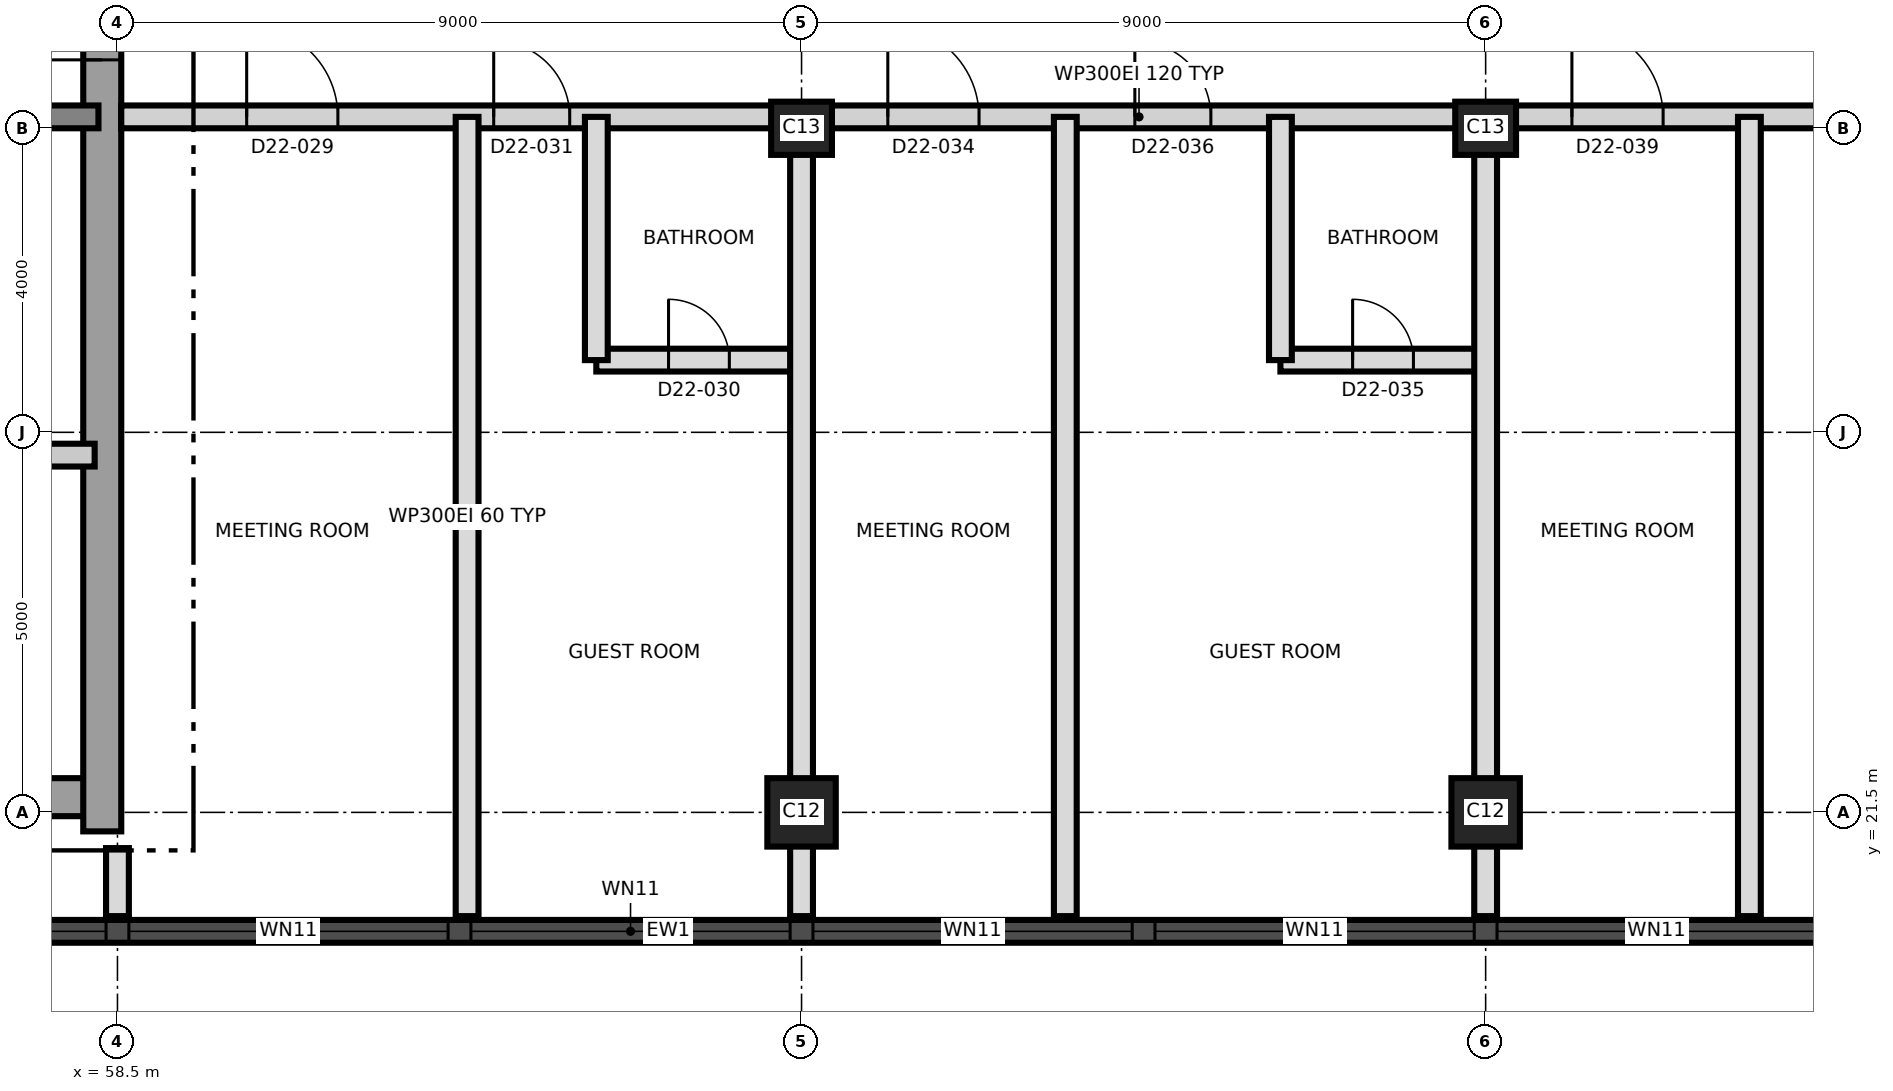
"""IFC4 building model, lengths in metres.
Left out: names, types, materials, properties, quantities, classifications, styles, units other than length and angle.
Written with IfcOpenShell. Run it as: python <this file> out.ifc"""

import sys

from ifc_helpers import new_model, si_unit, direction, frame, frame_2d, origin, origin_2d, place, context, subcontext, project, spatial, rectangle, extrude, element, fill, save


model = new_model("IFC4")
c1 = context("Model", 3, precision=1e-05, world=origin(), true_north=direction((0.0, 1.0)))
c2 = subcontext(c1, "Body", "Model", "MODEL_VIEW")
j1 = project(units=[si_unit("LENGTHUNIT", "METRE"), si_unit("PLANEANGLEUNIT", "RADIAN")], contexts=[c1])
p1 = place(None, origin())
s1 = spatial("IfcSite", under=j1, at=p1, CompositionType="ELEMENT")
p2 = place(p1, origin())
s2 = spatial("IfcBuilding", under=s1, at=p2, CompositionType="ELEMENT")
p3 = place(p2, frame((0.0, 0.0, 199.5)))
s3 = spatial("IfcBuildingStorey", under=s2, at=p3, CompositionType="ELEMENT", Elevation=199.5)
p4 = place(p3, frame((31.25, 21.7, 0.0), z_axis=(0.0, 0.0, 1.0), x_axis=(1.0, 0.0, 0.0)))
e1 = element("IfcWall", 1, at=p4, inside=s3, PredefinedType="SHEAR", context=c2, shape_type="SweptSolid", body=[
    extrude(rectangle(XDim=27.0, YDim=0.5, at=frame_2d((13.5, 0.0))), origin(), (0.0, 0.0, 1.0), 3.7),
])
p5 = place(p3, frame((58.3, 21.25, 0.0), z_axis=(0.0, 0.0, 1.0), x_axis=(0.0, 1.0, 0.0)))
e2 = element("IfcWall", 2, at=p5, inside=s3, PredefinedType="SHEAR", context=c2, shape_type="SweptSolid", body=[
    extrude(rectangle(XDim=18.5, YDim=0.5, at=frame_2d((9.25, 0.0))), origin(), (0.0, 0.0, 1.0), 3.7),
])
p6 = place(p5, frame((10.15, 0.0, 0.0)))
e3 = element("IfcOpeningElement", 3, at=p6, cuts=e2, PredefinedType="OPENING", context=c2, shape_type="SweptSolid", body=[
    extrude(rectangle(XDim=1.2, YDim=2.1, at=frame_2d((0.6, 1.05))), frame((0.0, 0.26, 0.0), z_axis=(0.0, -1.0, 0.0), x_axis=(1.0, 0.0, 0.0)), (0.0, 0.0, 1.0), 0.52),
])
p7 = place(p3, frame((31.75, 30.65, 0.0), z_axis=(0.0, 0.0, 1.0), x_axis=(1.0, 0.0, 0.0)))
e4 = element("IfcWall", 4, at=p7, inside=s3, PredefinedType="SHEAR", context=c2, shape_type="SweptSolid", body=[
    extrude(rectangle(XDim=26.5, YDim=0.3, at=frame_2d((13.25, 0.0))), origin(), (0.0, 0.0, 1.0), 3.7),
])
p8 = place(p7, frame((24.75, 0.0, 0.0)))
e5 = element("IfcOpeningElement", 5, at=p8, cuts=e4, PredefinedType="OPENING", context=c2, shape_type="SweptSolid", body=[
    extrude(rectangle(XDim=1.0, YDim=2.1, at=frame_2d((0.5, 1.05))), frame((0.0, 0.16, 0.0), z_axis=(0.0, -1.0, 0.0), x_axis=(1.0, 0.0, 0.0)), (0.0, 0.0, 1.0), 0.32),
])
p9 = place(p7, frame((4.05, 0.0, 0.0)))
e6 = element("IfcOpeningElement", 6, at=p9, cuts=e4, PredefinedType="OPENING", context=c2, shape_type="SweptSolid", body=[
    extrude(rectangle(XDim=1.0, YDim=2.1, at=frame_2d((0.5, 1.05))), frame((0.0, 0.16, 0.0), z_axis=(0.0, -1.0, 0.0), x_axis=(1.0, 0.0, 0.0)), (0.0, 0.0, 1.0), 0.32),
])
for number, where, z_axis, x_axis in (
    (7, (67.5, 21.5, 0.0), (0.0, 0.0, 1.0), (1.0, 0.0, 0.0)),
    (8, (76.5, 21.5, 0.0), (0.0, 0.0, 1.0), (1.0, 0.0, 0.0)),
):
    element("IfcColumn", number, at=place(p3, frame(where, z_axis=z_axis, x_axis=x_axis)), inside=s3, PredefinedType="COLUMN", context=c2, shape_type="SweptSolid", body=[
        extrude(rectangle(XDim=0.9, YDim=0.9, at=origin_2d()), origin(), (0.0, 0.0, 1.0), 3.7),
    ])
for number, where, z_axis, x_axis in (
    (9, (67.5, 30.5, 0.0), (0.0, 0.0, 1.0), (1.0, 0.0, 0.0)),
    (10, (76.5, 30.5, 0.0), (0.0, 0.0, 1.0), (1.0, 0.0, 0.0)),
):
    element("IfcColumn", number, at=place(p3, frame(where, z_axis=z_axis, x_axis=x_axis)), inside=s3, PredefinedType="COLUMN", context=c2, shape_type="SweptSolid", body=[
        extrude(rectangle(XDim=0.8, YDim=0.7, at=origin_2d()), origin(), (0.0, 0.0, 1.0), 3.7),
    ])
p10 = place(p3, frame((44.01, 19.935, 0.0), z_axis=(0.0, 0.0, 1.0), x_axis=(1.0, 0.0, 0.0)))
e11 = element("IfcWall", 11, at=p10, inside=s3, PredefinedType="SOLIDWALL", context=c2, shape_type="SweptSolid", body=[
    extrude(rectangle(XDim=43.477, YDim=0.3, at=frame_2d((21.738, 0.0))), origin(), (0.0, 0.0, 1.0), 3.4),
])
p11 = place(p10, frame((1.845, 0.0, 0.3)))
e12 = element("IfcOpeningElement", 12, at=p11, cuts=e11, PredefinedType="OPENING", context=c2, shape_type="SweptSolid", body=[
    extrude(rectangle(XDim=1.8, YDim=2.4, at=frame_2d((0.9, 1.2))), frame((0.0, 0.16, 0.0), z_axis=(0.0, -1.0, 0.0), x_axis=(1.0, 0.0, 0.0)), (0.0, 0.0, 1.0), 0.32),
])
p12 = place(p10, frame((5.64, 0.0, 0.9)))
e13 = element("IfcOpeningElement", 13, at=p12, cuts=e11, PredefinedType="OPENING", context=c2, shape_type="SweptSolid", body=[
    extrude(rectangle(XDim=4.2, YDim=1.5, at=frame_2d((2.1, 0.75))), frame((0.0, 0.16, 0.0), z_axis=(0.0, -1.0, 0.0), x_axis=(1.0, 0.0, 0.0)), (0.0, 0.0, 1.0), 0.32),
])
p13 = place(p10, frame((10.14, 0.0, 0.9)))
e14 = element("IfcOpeningElement", 14, at=p13, cuts=e11, PredefinedType="OPENING", context=c2, shape_type="SweptSolid", body=[
    extrude(rectangle(XDim=4.2, YDim=1.5, at=frame_2d((2.1, 0.75))), frame((0.0, 0.16, 0.0), z_axis=(0.0, -1.0, 0.0), x_axis=(1.0, 0.0, 0.0)), (0.0, 0.0, 1.0), 0.32),
])
p14 = place(p10, frame((14.64, 0.0, 0.9)))
e15 = element("IfcOpeningElement", 15, at=p14, cuts=e11, PredefinedType="OPENING", context=c2, shape_type="SweptSolid", body=[
    extrude(rectangle(XDim=4.2, YDim=1.5, at=frame_2d((2.1, 0.75))), frame((0.0, 0.16, 0.0), z_axis=(0.0, -1.0, 0.0), x_axis=(1.0, 0.0, 0.0)), (0.0, 0.0, 1.0), 0.32),
])
p15 = place(p10, frame((19.14, 0.0, 0.9)))
e16 = element("IfcOpeningElement", 16, at=p15, cuts=e11, PredefinedType="OPENING", context=c2, shape_type="SweptSolid", body=[
    extrude(rectangle(XDim=4.2, YDim=1.5, at=frame_2d((2.1, 0.75))), frame((0.0, 0.16, 0.0), z_axis=(0.0, -1.0, 0.0), x_axis=(1.0, 0.0, 0.0)), (0.0, 0.0, 1.0), 0.32),
])
p16 = place(p10, frame((23.64, 0.0, 0.9)))
e17 = element("IfcOpeningElement", 17, at=p16, cuts=e11, PredefinedType="OPENING", context=c2, shape_type="SweptSolid", body=[
    extrude(rectangle(XDim=4.2, YDim=1.5, at=frame_2d((2.1, 0.75))), frame((0.0, 0.16, 0.0), z_axis=(0.0, -1.0, 0.0), x_axis=(1.0, 0.0, 0.0)), (0.0, 0.0, 1.0), 0.32),
])
p17 = place(p10, frame((28.14, 0.0, 0.9)))
e18 = element("IfcOpeningElement", 18, at=p17, cuts=e11, PredefinedType="OPENING", context=c2, shape_type="SweptSolid", body=[
    extrude(rectangle(XDim=4.2, YDim=1.5, at=frame_2d((2.1, 0.75))), frame((0.0, 0.16, 0.0), z_axis=(0.0, -1.0, 0.0), x_axis=(1.0, 0.0, 0.0)), (0.0, 0.0, 1.0), 0.32),
])
p18 = place(p10, frame((32.64, 0.0, 0.9)))
e19 = element("IfcOpeningElement", 19, at=p18, cuts=e11, PredefinedType="OPENING", context=c2, shape_type="SweptSolid", body=[
    extrude(rectangle(XDim=4.2, YDim=1.5, at=frame_2d((2.1, 0.75))), frame((0.0, 0.16, 0.0), z_axis=(0.0, -1.0, 0.0), x_axis=(1.0, 0.0, 0.0)), (0.0, 0.0, 1.0), 0.32),
])
p19 = place(p10, frame((37.14, 0.0, 0.9)))
e20 = element("IfcOpeningElement", 20, at=p19, cuts=e11, PredefinedType="OPENING", context=c2, shape_type="SweptSolid", body=[
    extrude(rectangle(XDim=4.2, YDim=1.5, at=frame_2d((2.1, 0.75))), frame((0.0, 0.16, 0.0), z_axis=(0.0, -1.0, 0.0), x_axis=(1.0, 0.0, 0.0)), (0.0, 0.0, 1.0), 0.32),
])
p20 = place(p3, frame((55.8, 26.2, 0.0), z_axis=(0.0, 0.0, 1.0), x_axis=(1.0, 0.0, 0.0)))
e21 = element("IfcWall", 21, at=p20, inside=s3, PredefinedType="PARTITIONING", context=c2, shape_type="SweptSolid", body=[
    extrude(rectangle(XDim=2.4, YDim=0.3, at=frame_2d((1.2, 0.0))), origin(), (0.0, 0.0, 1.0), 3.4),
])
p21 = place(p20, frame((0.75, 0.0, 0.0)))
e22 = element("IfcOpeningElement", 22, at=p21, cuts=e21, PredefinedType="OPENING", context=c2, shape_type="SweptSolid", body=[
    extrude(rectangle(XDim=0.9, YDim=2.1, at=frame_2d((0.45, 1.05))), frame((0.0, 0.16, 0.0), z_axis=(0.0, -1.0, 0.0), x_axis=(1.0, 0.0, 0.0)), (0.0, 0.0, 1.0), 0.32),
])
p22 = place(p3, frame((64.8, 27.45, 0.0), z_axis=(0.0, 0.0, 1.0), x_axis=(1.0, 0.0, 0.0)))
e23 = element("IfcWall", 23, at=p22, inside=s3, PredefinedType="PARTITIONING", context=c2, shape_type="SweptSolid", body=[
    extrude(rectangle(XDim=2.7, YDim=0.3, at=frame_2d((1.35, 0.0))), origin(), (0.0, 0.0, 1.0), 3.4),
])
p23 = place(p22, frame((0.95, 0.0, 0.0)))
e24 = element("IfcOpeningElement", 24, at=p23, cuts=e23, PredefinedType="OPENING", context=c2, shape_type="SweptSolid", body=[
    extrude(rectangle(XDim=0.8, YDim=2.1, at=frame_2d((0.4, 1.05))), frame((0.0, 0.16, 0.0), z_axis=(0.0, -1.0, 0.0), x_axis=(1.0, 0.0, 0.0)), (0.0, 0.0, 1.0), 0.32),
])
p24 = place(p3, frame((73.8, 27.45, 0.0), z_axis=(0.0, 0.0, 1.0), x_axis=(1.0, 0.0, 0.0)))
e25 = element("IfcWall", 25, at=p24, inside=s3, PredefinedType="PARTITIONING", context=c2, shape_type="SweptSolid", body=[
    extrude(rectangle(XDim=2.7, YDim=0.3, at=frame_2d((1.35, 0.0))), origin(), (0.0, 0.0, 1.0), 3.4),
])
p25 = place(p24, frame((0.95, 0.0, 0.0)))
e26 = element("IfcOpeningElement", 26, at=p25, cuts=e25, PredefinedType="OPENING", context=c2, shape_type="SweptSolid", body=[
    extrude(rectangle(XDim=0.8, YDim=2.1, at=frame_2d((0.4, 1.05))), frame((0.0, 0.16, 0.0), z_axis=(0.0, -1.0, 0.0), x_axis=(1.0, 0.0, 0.0)), (0.0, 0.0, 1.0), 0.32),
])
p26 = place(p3, frame((58.55, 30.65, 0.0), z_axis=(0.0, 0.0, 1.0), x_axis=(1.0, 0.0, 0.0)))
e27 = element("IfcWall", 27, at=p26, inside=s3, PredefinedType="PARTITIONING", context=c2, shape_type="SweptSolid", body=[
    extrude(rectangle(XDim=26.78, YDim=0.3, at=frame_2d((13.39, 0.0))), origin(), (0.0, 0.0, 1.0), 3.4),
])
p27 = place(p26, frame((1.65, 0.0, 0.0)))
e28 = element("IfcOpeningElement", 28, at=p27, cuts=e27, PredefinedType="OPENING", context=c2, shape_type="SweptSolid", body=[
    extrude(rectangle(XDim=1.2, YDim=2.1, at=frame_2d((0.6, 1.05))), frame((0.0, 0.16, 0.0), z_axis=(0.0, -1.0, 0.0), x_axis=(1.0, 0.0, 0.0)), (0.0, 0.0, 1.0), 0.32),
])
p28 = place(p26, frame((4.9, 0.0, 0.0)))
e29 = element("IfcOpeningElement", 29, at=p28, cuts=e27, PredefinedType="OPENING", context=c2, shape_type="SweptSolid", body=[
    extrude(rectangle(XDim=1.0, YDim=2.1, at=frame_2d((0.5, 1.05))), frame((0.0, 0.16, 0.0), z_axis=(0.0, -1.0, 0.0), x_axis=(1.0, 0.0, 0.0)), (0.0, 0.0, 1.0), 0.32),
])
p29 = place(p26, frame((10.085, 0.0, 0.0)))
e30 = element("IfcOpeningElement", 30, at=p29, cuts=e27, PredefinedType="OPENING", context=c2, shape_type="SweptSolid", body=[
    extrude(rectangle(XDim=1.2, YDim=2.1, at=frame_2d((0.6, 1.05))), frame((0.0, 0.16, 0.0), z_axis=(0.0, -1.0, 0.0), x_axis=(1.0, 0.0, 0.0)), (0.0, 0.0, 1.0), 0.32),
])
p30 = place(p26, frame((13.335, 0.0, 0.0)))
e31 = element("IfcOpeningElement", 31, at=p30, cuts=e27, PredefinedType="OPENING", context=c2, shape_type="SweptSolid", body=[
    extrude(rectangle(XDim=1.0, YDim=2.1, at=frame_2d((0.5, 1.05))), frame((0.0, 0.16, 0.0), z_axis=(0.0, -1.0, 0.0), x_axis=(1.0, 0.0, 0.0)), (0.0, 0.0, 1.0), 0.32),
])
p31 = place(p26, frame((19.085, 0.0, 0.0)))
e32 = element("IfcOpeningElement", 32, at=p31, cuts=e27, PredefinedType="OPENING", context=c2, shape_type="SweptSolid", body=[
    extrude(rectangle(XDim=1.2, YDim=2.1, at=frame_2d((0.6, 1.05))), frame((0.0, 0.16, 0.0), z_axis=(0.0, -1.0, 0.0), x_axis=(1.0, 0.0, 0.0)), (0.0, 0.0, 1.0), 0.32),
])
p32 = place(p26, frame((22.335, 0.0, 0.0)))
e33 = element("IfcOpeningElement", 33, at=p32, cuts=e27, PredefinedType="OPENING", context=c2, shape_type="SweptSolid", body=[
    extrude(rectangle(XDim=1.0, YDim=2.1, at=frame_2d((0.5, 1.05))), frame((0.0, 0.16, 0.0), z_axis=(0.0, -1.0, 0.0), x_axis=(1.0, 0.0, 0.0)), (0.0, 0.0, 1.0), 0.32),
])
p33 = place(p3, frame((58.5, 20.135, 0.0), z_axis=(0.0, 0.0, 1.0), x_axis=(0.0, 1.0, 0.0)))
e34 = element("IfcWall", 34, at=p33, inside=s3, PredefinedType="PARTITIONING", context=c2, shape_type="SweptSolid", body=[
    extrude(rectangle(XDim=0.895, YDim=0.3, at=frame_2d((0.448, 0.0))), origin(), (0.0, 0.0, 1.0), 3.4),
])
p34 = place(p3, frame((63.1, 20.135, 0.0), z_axis=(0.0, 0.0, 1.0), x_axis=(0.0, 1.0, 0.0)))
e35 = element("IfcWall", 35, at=p34, inside=s3, PredefinedType="PARTITIONING", context=c2, shape_type="SweptSolid", body=[
    extrude(rectangle(XDim=10.515, YDim=0.3, at=frame_2d((5.257, 0.0))), origin(), (0.0, 0.0, 1.0), 3.4),
])
p35 = place(p3, frame((64.8, 27.45, 0.0), z_axis=(0.0, 0.0, 1.0), x_axis=(0.0, 1.0, 0.0)))
e36 = element("IfcWall", 36, at=p35, inside=s3, PredefinedType="PARTITIONING", context=c2, shape_type="SweptSolid", body=[
    extrude(rectangle(XDim=3.2, YDim=0.3, at=frame_2d((1.6, 0.0))), origin(), (0.0, 0.0, 1.0), 3.4),
])
for number, where, z_axis, x_axis in (
    (37, (67.5, 20.135, 0.0), (0.0, 0.0, 1.0), (0.0, 1.0, 0.0)),
    (38, (70.97, 20.135, 0.0), (0.0, 0.0, 1.0), (0.0, 1.0, 0.0)),
):
    element("IfcWall", number, at=place(p3, frame(where, z_axis=z_axis, x_axis=x_axis)), inside=s3, PredefinedType="PARTITIONING", context=c2, shape_type="SweptSolid", body=[
        extrude(rectangle(XDim=10.515, YDim=0.3, at=frame_2d((5.257, 0.0))), origin(), (0.0, 0.0, 1.0), 3.4),
    ])
p36 = place(p3, frame((73.8, 27.45, 0.0), z_axis=(0.0, 0.0, 1.0), x_axis=(0.0, 1.0, 0.0)))
e39 = element("IfcWall", 39, at=p36, inside=s3, PredefinedType="PARTITIONING", context=c2, shape_type="SweptSolid", body=[
    extrude(rectangle(XDim=3.2, YDim=0.3, at=frame_2d((1.6, 0.0))), origin(), (0.0, 0.0, 1.0), 3.4),
])
for number, where, z_axis, x_axis in (
    (40, (76.5, 20.135, 0.0), (0.0, 0.0, 1.0), (0.0, 1.0, 0.0)),
    (41, (79.97, 20.135, 0.0), (0.0, 0.0, 1.0), (0.0, 1.0, 0.0)),
):
    element("IfcWall", number, at=place(p3, frame(where, z_axis=z_axis, x_axis=x_axis)), inside=s3, PredefinedType="PARTITIONING", context=c2, shape_type="SweptSolid", body=[
        extrude(rectangle(XDim=10.515, YDim=0.3, at=frame_2d((5.257, 0.0))), origin(), (0.0, 0.0, 1.0), 3.4),
    ])
p37 = place(p13, origin())
e42 = element("IfcWindow", 42, at=p37, inside=s3, PartitioningType="SINGLE_PANEL", PredefinedType="WINDOW", context=c2, shape_type="SweptSolid", body=[
    extrude(rectangle(XDim=4.2, YDim=1.5, at=frame_2d((2.1, 0.75))), frame((0.0, 0.03, 0.0), z_axis=(0.0, -1.0, 0.0), x_axis=(1.0, 0.0, 0.0)), (0.0, 0.0, 1.0), 0.06),
])
fill(e14, e42)
p38 = place(p14, origin())
e43 = element("IfcWindow", 43, at=p38, inside=s3, PartitioningType="SINGLE_PANEL", PredefinedType="WINDOW", context=c2, shape_type="SweptSolid", body=[
    extrude(rectangle(XDim=4.2, YDim=1.5, at=frame_2d((2.1, 0.75))), frame((0.0, 0.03, 0.0), z_axis=(0.0, -1.0, 0.0), x_axis=(1.0, 0.0, 0.0)), (0.0, 0.0, 1.0), 0.06),
])
fill(e15, e43)
p39 = place(p15, origin())
e44 = element("IfcWindow", 44, at=p39, inside=s3, PartitioningType="SINGLE_PANEL", PredefinedType="WINDOW", context=c2, shape_type="SweptSolid", body=[
    extrude(rectangle(XDim=4.2, YDim=1.5, at=frame_2d((2.1, 0.75))), frame((0.0, 0.03, 0.0), z_axis=(0.0, -1.0, 0.0), x_axis=(1.0, 0.0, 0.0)), (0.0, 0.0, 1.0), 0.06),
])
fill(e16, e44)
p40 = place(p16, origin())
e45 = element("IfcWindow", 45, at=p40, inside=s3, PartitioningType="SINGLE_PANEL", PredefinedType="WINDOW", context=c2, shape_type="SweptSolid", body=[
    extrude(rectangle(XDim=4.2, YDim=1.5, at=frame_2d((2.1, 0.75))), frame((0.0, 0.03, 0.0), z_axis=(0.0, -1.0, 0.0), x_axis=(1.0, 0.0, 0.0)), (0.0, 0.0, 1.0), 0.06),
])
fill(e17, e45)
p41 = place(p17, origin())
e46 = element("IfcWindow", 46, at=p41, inside=s3, PartitioningType="SINGLE_PANEL", PredefinedType="WINDOW", context=c2, shape_type="SweptSolid", body=[
    extrude(rectangle(XDim=4.2, YDim=1.5, at=frame_2d((2.1, 0.75))), frame((0.0, 0.03, 0.0), z_axis=(0.0, -1.0, 0.0), x_axis=(1.0, 0.0, 0.0)), (0.0, 0.0, 1.0), 0.06),
])
fill(e18, e46)
p42 = place(p18, origin())
e47 = element("IfcWindow", 47, at=p42, inside=s3, PartitioningType="SINGLE_PANEL", PredefinedType="WINDOW", context=c2, shape_type="SweptSolid", body=[
    extrude(rectangle(XDim=4.2, YDim=1.5, at=frame_2d((2.1, 0.75))), frame((0.0, 0.03, 0.0), z_axis=(0.0, -1.0, 0.0), x_axis=(1.0, 0.0, 0.0)), (0.0, 0.0, 1.0), 0.06),
])
fill(e19, e47)
p43 = place(p6, origin())
e48 = element("IfcDoor", 48, at=p43, inside=s3, OperationType="SINGLE_SWING_LEFT", PredefinedType="DOOR", context=c2, shape_type="SweptSolid", body=[
    extrude(rectangle(XDim=1.2, YDim=2.1, at=frame_2d((0.6, 1.05))), frame((0.0, 0.025, 0.0), z_axis=(0.0, -1.0, 0.0), x_axis=(1.0, 0.0, 0.0)), (0.0, 0.0, 1.0), 0.05),
])
fill(e3, e48)
p44 = place(p27, origin())
e49 = element("IfcDoor", 49, at=p44, inside=s3, OperationType="SINGLE_SWING_LEFT", PredefinedType="DOOR", context=c2, shape_type="SweptSolid", body=[
    extrude(rectangle(XDim=1.2, YDim=2.1, at=frame_2d((0.6, 1.05))), frame((0.0, 0.025, 0.0), z_axis=(0.0, -1.0, 0.0), x_axis=(1.0, 0.0, 0.0)), (0.0, 0.0, 1.0), 0.05),
])
fill(e28, e49)
p45 = place(p23, origin())
e50 = element("IfcDoor", 50, at=p45, inside=s3, OperationType="SINGLE_SWING_RIGHT", PredefinedType="DOOR", context=c2, shape_type="SweptSolid", body=[
    extrude(rectangle(XDim=0.8, YDim=2.1, at=frame_2d((0.4, 1.05))), frame((0.0, 0.025, 0.0), z_axis=(0.0, -1.0, 0.0), x_axis=(1.0, 0.0, 0.0)), (0.0, 0.0, 1.0), 0.05),
])
fill(e24, e50)
p46 = place(p28, origin())
e51 = element("IfcDoor", 51, at=p46, inside=s3, OperationType="SINGLE_SWING_LEFT", PredefinedType="DOOR", context=c2, shape_type="SweptSolid", body=[
    extrude(rectangle(XDim=1.0, YDim=2.1, at=frame_2d((0.5, 1.05))), frame((0.0, 0.025, 0.0), z_axis=(0.0, -1.0, 0.0), x_axis=(1.0, 0.0, 0.0)), (0.0, 0.0, 1.0), 0.05),
])
fill(e29, e51)
p47 = place(p29, origin())
e52 = element("IfcDoor", 52, at=p47, inside=s3, OperationType="SINGLE_SWING_RIGHT", PredefinedType="DOOR", context=c2, shape_type="SweptSolid", body=[
    extrude(rectangle(XDim=1.2, YDim=2.1, at=frame_2d((0.6, 1.05))), frame((0.0, 0.025, 0.0), z_axis=(0.0, -1.0, 0.0), x_axis=(1.0, 0.0, 0.0)), (0.0, 0.0, 1.0), 0.05),
])
fill(e30, e52)
p48 = place(p25, origin())
e53 = element("IfcDoor", 53, at=p48, inside=s3, OperationType="SINGLE_SWING_LEFT", PredefinedType="DOOR", context=c2, shape_type="SweptSolid", body=[
    extrude(rectangle(XDim=0.8, YDim=2.1, at=frame_2d((0.4, 1.05))), frame((0.0, 0.025, 0.0), z_axis=(0.0, -1.0, 0.0), x_axis=(1.0, 0.0, 0.0)), (0.0, 0.0, 1.0), 0.05),
])
fill(e26, e53)
p49 = place(p30, origin())
e54 = element("IfcDoor", 54, at=p49, inside=s3, OperationType="SINGLE_SWING_LEFT", PredefinedType="DOOR", context=c2, shape_type="SweptSolid", body=[
    extrude(rectangle(XDim=1.0, YDim=2.1, at=frame_2d((0.5, 1.05))), frame((0.0, 0.025, 0.0), z_axis=(0.0, -1.0, 0.0), x_axis=(1.0, 0.0, 0.0)), (0.0, 0.0, 1.0), 0.05),
])
fill(e31, e54)
p50 = place(p31, origin())
e55 = element("IfcDoor", 55, at=p50, inside=s3, OperationType="SINGLE_SWING_LEFT", PredefinedType="DOOR", context=c2, shape_type="SweptSolid", body=[
    extrude(rectangle(XDim=1.2, YDim=2.1, at=frame_2d((0.6, 1.05))), frame((0.0, 0.025, 0.0), z_axis=(0.0, -1.0, 0.0), x_axis=(1.0, 0.0, 0.0)), (0.0, 0.0, 1.0), 0.05),
])
fill(e32, e55)
save(model, sys.argv[1])
